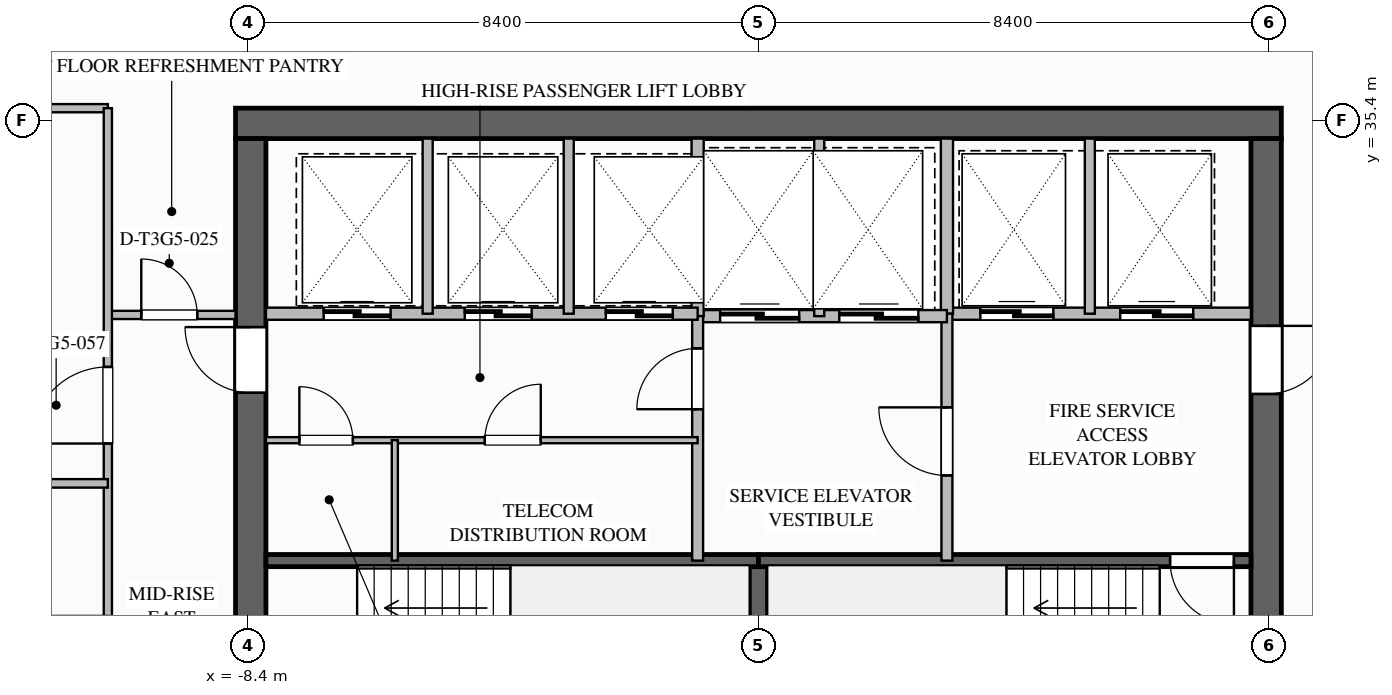
"""IFC4 building model, lengths in metres.
Left out: names, types, materials, properties, quantities, classifications, styles, units other than length and angle.
Written with IfcOpenShell. Run it as: python <this file> out.ifc"""

import sys

from ifc_helpers import new_model, si_unit, direction, frame, frame_2d, origin, place, context, subcontext, project, spatial, rectangle, extrude, element, fill, save


model = new_model("IFC4")
c1 = context("Model", 3, precision=1e-05, world=origin(), true_north=direction((0.0, 1.0)))
c2 = subcontext(c1, "Body", "Model", "MODEL_VIEW")
j1 = project(units=[si_unit("LENGTHUNIT", "METRE"), si_unit("PLANEANGLEUNIT", "RADIAN")], contexts=[c1])
p1 = place(None, origin())
s1 = spatial("IfcSite", under=j1, at=p1, CompositionType="ELEMENT")
p2 = place(p1, origin())
s2 = spatial("IfcBuilding", under=s1, at=p2, CompositionType="ELEMENT")
p3 = place(p2, frame((0.0, 0.0, 193.0)))
s3 = spatial("IfcBuildingStorey", under=s2, at=p3, CompositionType="ELEMENT", Elevation=193.0)
p4 = place(p3, frame((-8.6, 35.35, 0.0), z_axis=(0.0, 0.0, 1.0), x_axis=(1.0, 0.0, 0.0)))
e1 = element("IfcWall", 1, at=p4, inside=s3, PredefinedType="SHEAR", context=c2, shape_type="SweptSolid", body=[
    extrude(rectangle(XDim=17.2, YDim=0.5, at=frame_2d((8.6, 0.0))), origin(), (0.0, 0.0, 1.0), 3.55),
])
p5 = place(p3, frame((8.35, 35.1, 0.0), z_axis=(0.0, 0.0, 1.0), x_axis=(0.0, -1.0, 0.0)))
e2 = element("IfcWall", 2, at=p5, inside=s3, PredefinedType="SHEAR", context=c2, shape_type="SweptSolid", body=[
    extrude(rectangle(XDim=16.2, YDim=0.5, at=frame_2d((8.1, 0.0))), origin(), (0.0, 0.0, 1.0), 3.55),
])
p6 = place(p5, frame((3.08, 0.0, 0.0)))
e3 = element("IfcOpeningElement", 3, at=p6, cuts=e2, PredefinedType="OPENING", context=c2, shape_type="SweptSolid", body=[
    extrude(rectangle(XDim=1.12, YDim=2.1, at=frame_2d((0.56, 1.05))), frame((0.0, 0.26, 0.0), z_axis=(0.0, -1.0, 0.0), x_axis=(1.0, 0.0, 0.0)), (0.0, 0.0, 1.0), 0.52),
])
p7 = place(p5, frame((10.62, 0.0, 0.0)))
e4 = element("IfcOpeningElement", 4, at=p7, cuts=e2, PredefinedType="OPENING", context=c2, shape_type="SweptSolid", body=[
    extrude(rectangle(XDim=1.08, YDim=2.04, at=frame_2d((0.54, 1.02))), frame((0.0, 0.26, 0.0), z_axis=(0.0, -1.0, 0.0), x_axis=(1.0, 0.0, 0.0)), (0.0, 0.0, 1.0), 0.52),
])
p8 = place(p3, frame((-8.35, 18.9, 0.0), z_axis=(0.0, 0.0, 1.0), x_axis=(0.0, 1.0, 0.0)))
e5 = element("IfcWall", 5, at=p8, inside=s3, PredefinedType="SHEAR", context=c2, shape_type="SweptSolid", body=[
    extrude(rectangle(XDim=16.2, YDim=0.5, at=frame_2d((8.1, 0.0))), origin(), (0.0, 0.0, 1.0), 3.55),
])
p9 = place(p8, frame((12.02, 0.0, 0.0)))
e6 = element("IfcOpeningElement", 6, at=p9, cuts=e5, PredefinedType="OPENING", context=c2, shape_type="SweptSolid", body=[
    extrude(rectangle(XDim=1.08, YDim=2.04, at=frame_2d((0.54, 1.02))), frame((0.0, 0.26, 0.0), z_axis=(0.0, -1.0, 0.0), x_axis=(1.0, 0.0, 0.0)), (0.0, 0.0, 1.0), 0.52),
])
p10 = place(p8, frame((4.5, 0.0, 0.0)))
e7 = element("IfcOpeningElement", 7, at=p10, cuts=e5, PredefinedType="OPENING", context=c2, shape_type="SweptSolid", body=[
    extrude(rectangle(XDim=1.08, YDim=2.04, at=frame_2d((0.54, 1.02))), frame((0.0, 0.26, 0.0), z_axis=(0.0, -1.0, 0.0), x_axis=(1.0, 0.0, 0.0)), (0.0, 0.0, 1.0), 0.52),
])
p11 = place(p3, frame((0.0, 25.04, 0.0), z_axis=(0.0, 0.0, 1.0), x_axis=(0.0, 1.0, 0.0)))
e8 = element("IfcWall", 8, at=p11, inside=s3, PredefinedType="SOLIDWALL", context=c2, shape_type="SweptSolid", body=[
    extrude(rectangle(XDim=3.12, YDim=0.3, at=frame_2d((1.56, 0.0))), origin(), (0.0, 0.0, 1.0), 3.29),
])
p12 = place(p3, frame((-8.1, 28.16, 0.0), z_axis=(0.0, 0.0, 1.0), x_axis=(1.0, 0.0, 0.0)))
e9 = element("IfcWall", 9, at=p12, inside=s3, PredefinedType="SOLIDWALL", context=c2, shape_type="SweptSolid", body=[
    extrude(rectangle(XDim=8.1, YDim=0.2, at=frame_2d((4.05, 0.0))), origin(), (0.0, 0.0, 1.0), 3.29),
])
p13 = place(p3, frame((8.1, 28.16, 0.0), z_axis=(0.0, 0.0, 1.0), x_axis=(-1.0, 0.0, 0.0)))
e10 = element("IfcWall", 10, at=p13, inside=s3, PredefinedType="SOLIDWALL", context=c2, shape_type="SweptSolid", body=[
    extrude(rectangle(XDim=8.1, YDim=0.2, at=frame_2d((4.05, 0.0))), origin(), (0.0, 0.0, 1.0), 3.29),
])
p14 = place(p13, frame((0.28, 0.0, 0.0)))
e11 = element("IfcOpeningElement", 11, at=p14, cuts=e10, PredefinedType="OPENING", context=c2, shape_type="SweptSolid", body=[
    extrude(rectangle(XDim=1.05, YDim=2.1, at=frame_2d((0.525, 1.05))), frame((0.0, 0.11, 0.0), z_axis=(0.0, -1.0, 0.0), x_axis=(1.0, 0.0, 0.0)), (0.0, 0.0, 1.0), 0.22),
])
p15 = place(p3, frame((3.1, 32.22, 0.0), z_axis=(0.0, 0.0, 1.0), x_axis=(1.0, 0.0, 0.0)))
e12 = element("IfcWall", 12, at=p15, inside=s3, PredefinedType="SOLIDWALL", context=c2, shape_type="SweptSolid", body=[
    extrude(rectangle(XDim=5.0, YDim=0.2, at=frame_2d((2.5, 0.0))), origin(), (0.0, 0.0, 1.0), 3.29),
])
p16 = place(p15, frame((0.55, 0.0, 0.0)))
e13 = element("IfcOpeningElement", 13, at=p16, cuts=e12, PredefinedType="OPENING", context=c2, shape_type="SweptSolid", body=[
    extrude(rectangle(XDim=1.2, YDim=2.2, at=frame_2d((0.6, 1.1))), frame((0.0, 0.11, 0.0), z_axis=(0.0, -1.0, 0.0), x_axis=(1.0, 0.0, 0.0)), (0.0, 0.0, 1.0), 0.22),
])
p17 = place(p15, frame((2.85, 0.0, 0.0)))
e14 = element("IfcOpeningElement", 14, at=p17, cuts=e12, PredefinedType="OPENING", context=c2, shape_type="SweptSolid", body=[
    extrude(rectangle(XDim=1.2, YDim=2.2, at=frame_2d((0.6, 1.1))), frame((0.0, 0.11, 0.0), z_axis=(0.0, -1.0, 0.0), x_axis=(1.0, 0.0, 0.0)), (0.0, 0.0, 1.0), 0.22),
])
p18 = place(p3, frame((3.1, 32.22, 0.0), z_axis=(0.0, 0.0, 1.0), x_axis=(0.0, 1.0, 0.0)))
e15 = element("IfcWall", 15, at=p18, inside=s3, PredefinedType="SOLIDWALL", context=c2, shape_type="SweptSolid", body=[
    extrude(rectangle(XDim=2.88, YDim=0.2, at=frame_2d((1.44, 0.0))), origin(), (0.0, 0.0, 1.0), 3.29),
])
p19 = place(p3, frame((5.45, 32.22, 0.0), z_axis=(0.0, 0.0, 1.0), x_axis=(0.0, 1.0, 0.0)))
e16 = element("IfcWall", 16, at=p19, inside=s3, PredefinedType="PARTITIONING", context=c2, shape_type="SweptSolid", body=[
    extrude(rectangle(XDim=2.88, YDim=0.165, at=frame_2d((1.44, 0.0))), origin(), (0.0, 0.0, 1.0), 3.29),
])
p20 = place(p3, frame((3.1, 28.16, 0.0), z_axis=(0.0, 0.0, 1.0), x_axis=(0.0, 1.0, 0.0)))
e17 = element("IfcWall", 17, at=p20, inside=s3, PredefinedType="SOLIDWALL", context=c2, shape_type="SweptSolid", body=[
    extrude(rectangle(XDim=4.06, YDim=0.18, at=frame_2d((2.03, 0.0))), origin(), (0.0, 0.0, 1.0), 3.29),
])
p21 = place(p20, frame((1.4, 0.0, 0.0)))
e18 = element("IfcOpeningElement", 18, at=p21, cuts=e17, PredefinedType="OPENING", context=c2, shape_type="SweptSolid", body=[
    extrude(rectangle(XDim=1.12, YDim=2.1, at=frame_2d((0.56, 1.05))), frame((0.0, 0.1, 0.0), z_axis=(0.0, -1.0, 0.0), x_axis=(1.0, 0.0, 0.0)), (0.0, 0.0, 1.0), 0.2),
])
p22 = place(p3, frame((-1.0, 32.18, 0.0), z_axis=(0.0, 0.0, 1.0), x_axis=(1.0, 0.0, 0.0)))
e19 = element("IfcWall", 19, at=p22, inside=s3, PredefinedType="SOLIDWALL", context=c2, shape_type="SweptSolid", body=[
    extrude(rectangle(XDim=4.1, YDim=0.2, at=frame_2d((2.05, 0.0))), origin(), (0.0, 0.0, 1.0), 3.29),
])
p23 = place(p22, frame((0.37, 0.0, 0.0)))
e20 = element("IfcOpeningElement", 20, at=p23, cuts=e19, PredefinedType="OPENING", context=c2, shape_type="SweptSolid", body=[
    extrude(rectangle(XDim=1.3, YDim=2.2, at=frame_2d((0.65, 1.1))), frame((0.0, 0.11, 0.0), z_axis=(0.0, -1.0, 0.0), x_axis=(1.0, 0.0, 0.0)), (0.0, 0.0, 1.0), 0.22),
])
p24 = place(p22, frame((2.33, 0.0, 0.0)))
e21 = element("IfcOpeningElement", 21, at=p24, cuts=e19, PredefinedType="OPENING", context=c2, shape_type="SweptSolid", body=[
    extrude(rectangle(XDim=1.3, YDim=2.2, at=frame_2d((0.65, 1.1))), frame((0.0, 0.11, 0.0), z_axis=(0.0, -1.0, 0.0), x_axis=(1.0, 0.0, 0.0)), (0.0, 0.0, 1.0), 0.22),
])
p25 = place(p3, frame((-1.0, 32.18, 0.0), z_axis=(0.0, 0.0, 1.0), x_axis=(0.0, 1.0, 0.0)))
e22 = element("IfcWall", 22, at=p25, inside=s3, PredefinedType="SOLIDWALL", context=c2, shape_type="SweptSolid", body=[
    extrude(rectangle(XDim=2.92, YDim=0.2, at=frame_2d((1.46, 0.0))), origin(), (0.0, 0.0, 1.0), 3.29),
])
p26 = place(p3, frame((1.0, 32.18, 0.0), z_axis=(0.0, 0.0, 1.0), x_axis=(0.0, 1.0, 0.0)))
e23 = element("IfcWall", 23, at=p26, inside=s3, PredefinedType="PARTITIONING", context=c2, shape_type="SweptSolid", body=[
    extrude(rectangle(XDim=2.92, YDim=0.165, at=frame_2d((1.46, 0.0))), origin(), (0.0, 0.0, 1.0), 3.29),
])
p27 = place(p3, frame((-1.0, 28.16, 0.0), z_axis=(0.0, 0.0, 1.0), x_axis=(0.0, 1.0, 0.0)))
e24 = element("IfcWall", 24, at=p27, inside=s3, PredefinedType="SOLIDWALL", context=c2, shape_type="SweptSolid", body=[
    extrude(rectangle(XDim=4.02, YDim=0.18, at=frame_2d((2.01, 0.0))), origin(), (0.0, 0.0, 1.0), 3.29),
])
p28 = place(p27, frame((2.49, 0.0, 0.0)))
e25 = element("IfcOpeningElement", 25, at=p28, cuts=e24, PredefinedType="OPENING", context=c2, shape_type="SweptSolid", body=[
    extrude(rectangle(XDim=1.0, YDim=2.1, at=frame_2d((0.5, 1.05))), frame((0.0, 0.1, 0.0), z_axis=(0.0, -1.0, 0.0), x_axis=(1.0, 0.0, 0.0)), (0.0, 0.0, 1.0), 0.2),
])
p29 = place(p3, frame((-8.1, 32.22, 0.0), z_axis=(0.0, 0.0, 1.0), x_axis=(1.0, 0.0, 0.0)))
e26 = element("IfcWall", 26, at=p29, inside=s3, PredefinedType="SOLIDWALL", context=c2, shape_type="SweptSolid", body=[
    extrude(rectangle(XDim=7.1, YDim=0.2, at=frame_2d((3.55, 0.0))), origin(), (0.0, 0.0, 1.0), 3.29),
])
p30 = place(p29, frame((0.95, 0.0, 0.0)))
e27 = element("IfcOpeningElement", 27, at=p30, cuts=e26, PredefinedType="OPENING", context=c2, shape_type="SweptSolid", body=[
    extrude(rectangle(XDim=1.1, YDim=2.2, at=frame_2d((0.55, 1.1))), frame((0.0, 0.11, 0.0), z_axis=(0.0, -1.0, 0.0), x_axis=(1.0, 0.0, 0.0)), (0.0, 0.0, 1.0), 0.22),
])
p31 = place(p29, frame((3.27, 0.0, 0.0)))
e28 = element("IfcOpeningElement", 28, at=p31, cuts=e26, PredefinedType="OPENING", context=c2, shape_type="SweptSolid", body=[
    extrude(rectangle(XDim=1.1, YDim=2.2, at=frame_2d((0.55, 1.1))), frame((0.0, 0.11, 0.0), z_axis=(0.0, -1.0, 0.0), x_axis=(1.0, 0.0, 0.0)), (0.0, 0.0, 1.0), 0.22),
])
p32 = place(p29, frame((5.59, 0.0, 0.0)))
e29 = element("IfcOpeningElement", 29, at=p32, cuts=e26, PredefinedType="OPENING", context=c2, shape_type="SweptSolid", body=[
    extrude(rectangle(XDim=1.1, YDim=2.2, at=frame_2d((0.55, 1.1))), frame((0.0, 0.11, 0.0), z_axis=(0.0, -1.0, 0.0), x_axis=(1.0, 0.0, 0.0)), (0.0, 0.0, 1.0), 0.22),
])
for number, where, z_axis, x_axis in (
    (30, (-5.44, 32.22, 0.0), (0.0, 0.0, 1.0), (0.0, 1.0, 0.0)),
    (31, (-3.12, 32.22, 0.0), (0.0, 0.0, 1.0), (0.0, 1.0, 0.0)),
):
    element("IfcWall", number, at=place(p3, frame(where, z_axis=z_axis, x_axis=x_axis)), inside=s3, PredefinedType="PARTITIONING", context=c2, shape_type="SweptSolid", body=[
        extrude(rectangle(XDim=2.88, YDim=0.165, at=frame_2d((1.44, 0.0))), origin(), (0.0, 0.0, 1.0), 3.29),
    ])
p33 = place(p3, frame((-8.1, 30.14, 0.0), z_axis=(0.0, 0.0, 1.0), x_axis=(1.0, 0.0, 0.0)))
e32 = element("IfcWall", 32, at=p33, inside=s3, PredefinedType="PARTITIONING", context=c2, shape_type="SweptSolid", body=[
    extrude(rectangle(XDim=7.1, YDim=0.1, at=frame_2d((3.55, 0.0))), origin(), (0.0, 0.0, 1.0), 3.29),
])
p34 = place(p33, frame((0.55, 0.0, 0.0)))
e33 = element("IfcOpeningElement", 33, at=p34, cuts=e32, PredefinedType="OPENING", context=c2, shape_type="SweptSolid", body=[
    extrude(rectangle(XDim=0.88, YDim=2.1, at=frame_2d((0.44, 1.05))), frame((0.0, 0.06, 0.0), z_axis=(0.0, -1.0, 0.0), x_axis=(1.0, 0.0, 0.0)), (0.0, 0.0, 1.0), 0.12),
])
p35 = place(p33, frame((3.6, 0.0, 0.0)))
e34 = element("IfcOpeningElement", 34, at=p35, cuts=e32, PredefinedType="OPENING", context=c2, shape_type="SweptSolid", body=[
    extrude(rectangle(XDim=0.92, YDim=2.1, at=frame_2d((0.46, 1.05))), frame((0.0, 0.06, 0.0), z_axis=(0.0, -1.0, 0.0), x_axis=(1.0, 0.0, 0.0)), (0.0, 0.0, 1.0), 0.12),
])
p36 = place(p3, frame((-5.98, 28.16, 0.0), z_axis=(0.0, 0.0, 1.0), x_axis=(0.0, 1.0, 0.0)))
e35 = element("IfcWall", 35, at=p36, inside=s3, PredefinedType="PARTITIONING", context=c2, shape_type="SweptSolid", body=[
    extrude(rectangle(XDim=1.98, YDim=0.1, at=frame_2d((0.99, 0.0))), origin(), (0.0, 0.0, 1.0), 3.29),
])
p37 = place(p3, frame((-10.7, 32.2, 0.0), z_axis=(0.0, 0.0, 1.0), x_axis=(1.0, 0.0, 0.0)))
e36 = element("IfcWall", 36, at=p37, inside=s3, PredefinedType="PARTITIONING", context=c2, shape_type="SweptSolid", body=[
    extrude(rectangle(XDim=2.1, YDim=0.135, at=frame_2d((1.05, 0.0))), origin(), (0.0, 0.0, 1.0), 3.29),
])
p38 = place(p37, frame((0.55, 0.0, 0.0)))
e37 = element("IfcOpeningElement", 37, at=p38, cuts=e36, PredefinedType="OPENING", context=c2, shape_type="SweptSolid", body=[
    extrude(rectangle(XDim=0.92, YDim=2.1, at=frame_2d((0.46, 1.05))), frame((0.0, 0.077, 0.0), z_axis=(0.0, -1.0, 0.0), x_axis=(1.0, 0.0, 0.0)), (0.0, 0.0, 1.0), 0.155),
])
p39 = place(p3, frame((-16.2, 35.6, 0.0), z_axis=(0.0, 0.0, 1.0), x_axis=(1.0, 0.0, 0.0)))
e38 = element("IfcWall", 38, at=p39, inside=s3, PredefinedType="PARTITIONING", context=c2, shape_type="SweptSolid", body=[
    extrude(rectangle(XDim=5.5, YDim=0.135, at=frame_2d((2.75, 0.0))), origin(), (0.0, 0.0, 1.0), 2.667),
])
p40 = place(p3, frame((-10.7, 18.4, 0.0), z_axis=(0.0, 0.0, 1.0), x_axis=(0.0, 1.0, 0.0)))
e39 = element("IfcWall", 39, at=p40, inside=s3, PredefinedType="PARTITIONING", context=c2, shape_type="SweptSolid", body=[
    extrude(rectangle(XDim=17.2, YDim=0.135, at=frame_2d((8.6, 0.0))), origin(), (0.0, 0.0, 1.0), 3.29),
])
p41 = place(p40, frame((4.255, 0.0, 0.0)))
e40 = element("IfcOpeningElement", 40, at=p41, cuts=e39, PredefinedType="OPENING", context=c2, shape_type="SweptSolid", body=[
    extrude(rectangle(XDim=1.26, YDim=2.2, at=frame_2d((0.63, 1.1))), frame((0.0, 0.077, 0.0), z_axis=(0.0, -1.0, 0.0), x_axis=(1.0, 0.0, 0.0)), (0.0, 0.0, 1.0), 0.155),
])
p42 = place(p40, frame((11.685, 0.0, 0.0)))
e41 = element("IfcOpeningElement", 41, at=p42, cuts=e39, PredefinedType="OPENING", context=c2, shape_type="SweptSolid", body=[
    extrude(rectangle(XDim=1.26, YDim=2.2, at=frame_2d((0.63, 1.1))), frame((0.0, 0.077, 0.0), z_axis=(0.0, -1.0, 0.0), x_axis=(1.0, 0.0, 0.0)), (0.0, 0.0, 1.0), 0.155),
])
p43 = place(p3, frame((-10.7, 29.43, 0.0), z_axis=(0.0, 0.0, 1.0), x_axis=(-1.0, 0.0, 0.0)))
e42 = element("IfcWall", 42, at=p43, inside=s3, PredefinedType="PLUMBINGWALL", context=c2, shape_type="SweptSolid", body=[
    extrude(rectangle(XDim=2.15, YDim=0.14, at=frame_2d((1.075, 0.0))), origin(), (0.0, 0.0, 1.0), 3.29),
])
p44 = place(p14, origin())
e43 = element("IfcDoor", 43, at=p44, inside=s3, OperationType="SINGLE_SWING_LEFT", PredefinedType="DOOR", context=c2, shape_type="SweptSolid", body=[
    extrude(rectangle(XDim=1.05, YDim=2.1, at=frame_2d((0.525, 1.05))), frame((0.0, 0.025, 0.0), z_axis=(0.0, -1.0, 0.0), x_axis=(1.0, 0.0, 0.0)), (0.0, 0.0, 1.0), 0.05),
])
fill(e11, e43)
p45 = place(p16, origin())
e44 = element("IfcDoor", 44, at=p45, inside=s3, OperationType="SLIDING_TO_LEFT", PredefinedType="DOOR", context=c2, shape_type="SweptSolid", body=[
    extrude(rectangle(XDim=1.2, YDim=2.2, at=frame_2d((0.6, 1.1))), frame((0.0, 0.025, 0.0), z_axis=(0.0, -1.0, 0.0), x_axis=(1.0, 0.0, 0.0)), (0.0, 0.0, 1.0), 0.05),
])
fill(e13, e44)
p46 = place(p17, origin())
e45 = element("IfcDoor", 45, at=p46, inside=s3, OperationType="SLIDING_TO_LEFT", PredefinedType="DOOR", context=c2, shape_type="SweptSolid", body=[
    extrude(rectangle(XDim=1.2, YDim=2.2, at=frame_2d((0.6, 1.1))), frame((0.0, 0.025, 0.0), z_axis=(0.0, -1.0, 0.0), x_axis=(1.0, 0.0, 0.0)), (0.0, 0.0, 1.0), 0.05),
])
fill(e14, e45)
p47 = place(p21, origin())
e46 = element("IfcDoor", 46, at=p47, inside=s3, OperationType="SINGLE_SWING_RIGHT", PredefinedType="DOOR", context=c2, shape_type="SweptSolid", body=[
    extrude(rectangle(XDim=1.12, YDim=2.1, at=frame_2d((0.56, 1.05))), frame((0.0, 0.025, 0.0), z_axis=(0.0, -1.0, 0.0), x_axis=(1.0, 0.0, 0.0)), (0.0, 0.0, 1.0), 0.05),
])
fill(e18, e46)
p48 = place(p6, origin())
e47 = element("IfcDoor", 47, at=p48, inside=s3, OperationType="SINGLE_SWING_LEFT", PredefinedType="DOOR", context=c2, shape_type="SweptSolid", body=[
    extrude(rectangle(XDim=1.12, YDim=2.1, at=frame_2d((0.56, 1.05))), frame((0.0, 0.025, 0.0), z_axis=(0.0, -1.0, 0.0), x_axis=(1.0, 0.0, 0.0)), (0.0, 0.0, 1.0), 0.05),
])
fill(e3, e47)
p49 = place(p23, origin())
e48 = element("IfcDoor", 48, at=p49, inside=s3, OperationType="SLIDING_TO_LEFT", PredefinedType="DOOR", context=c2, shape_type="SweptSolid", body=[
    extrude(rectangle(XDim=1.3, YDim=2.2, at=frame_2d((0.65, 1.1))), frame((0.0, 0.025, 0.0), z_axis=(0.0, -1.0, 0.0), x_axis=(1.0, 0.0, 0.0)), (0.0, 0.0, 1.0), 0.05),
])
fill(e20, e48)
p50 = place(p24, origin())
e49 = element("IfcDoor", 49, at=p50, inside=s3, OperationType="SLIDING_TO_LEFT", PredefinedType="DOOR", context=c2, shape_type="SweptSolid", body=[
    extrude(rectangle(XDim=1.3, YDim=2.2, at=frame_2d((0.65, 1.1))), frame((0.0, 0.025, 0.0), z_axis=(0.0, -1.0, 0.0), x_axis=(1.0, 0.0, 0.0)), (0.0, 0.0, 1.0), 0.05),
])
fill(e21, e49)
p51 = place(p28, origin())
e50 = element("IfcDoor", 50, at=p51, inside=s3, OperationType="SINGLE_SWING_LEFT", PredefinedType="DOOR", context=c2, shape_type="SweptSolid", body=[
    extrude(rectangle(XDim=1.0, YDim=2.1, at=frame_2d((0.5, 1.05))), frame((0.0, 0.025, 0.0), z_axis=(0.0, -1.0, 0.0), x_axis=(1.0, 0.0, 0.0)), (0.0, 0.0, 1.0), 0.05),
])
fill(e25, e50)
p52 = place(p30, origin())
e51 = element("IfcDoor", 51, at=p52, inside=s3, OperationType="SLIDING_TO_LEFT", PredefinedType="DOOR", context=c2, shape_type="SweptSolid", body=[
    extrude(rectangle(XDim=1.1, YDim=2.2, at=frame_2d((0.55, 1.1))), frame((0.0, 0.025, 0.0), z_axis=(0.0, -1.0, 0.0), x_axis=(1.0, 0.0, 0.0)), (0.0, 0.0, 1.0), 0.05),
])
fill(e27, e51)
p53 = place(p31, origin())
e52 = element("IfcDoor", 52, at=p53, inside=s3, OperationType="SLIDING_TO_LEFT", PredefinedType="DOOR", context=c2, shape_type="SweptSolid", body=[
    extrude(rectangle(XDim=1.1, YDim=2.2, at=frame_2d((0.55, 1.1))), frame((0.0, 0.025, 0.0), z_axis=(0.0, -1.0, 0.0), x_axis=(1.0, 0.0, 0.0)), (0.0, 0.0, 1.0), 0.05),
])
fill(e28, e52)
p54 = place(p32, origin())
e53 = element("IfcDoor", 53, at=p54, inside=s3, OperationType="SLIDING_TO_LEFT", PredefinedType="DOOR", context=c2, shape_type="SweptSolid", body=[
    extrude(rectangle(XDim=1.1, YDim=2.2, at=frame_2d((0.55, 1.1))), frame((0.0, 0.025, 0.0), z_axis=(0.0, -1.0, 0.0), x_axis=(1.0, 0.0, 0.0)), (0.0, 0.0, 1.0), 0.05),
])
fill(e29, e53)
p55 = place(p9, origin())
e54 = element("IfcDoor", 54, at=p55, inside=s3, OperationType="SINGLE_SWING_RIGHT", PredefinedType="DOOR", context=c2, shape_type="SweptSolid", body=[
    extrude(rectangle(XDim=1.08, YDim=2.04, at=frame_2d((0.54, 1.02))), frame((0.0, 0.025, 0.0), z_axis=(0.0, -1.0, 0.0), x_axis=(1.0, 0.0, 0.0)), (0.0, 0.0, 1.0), 0.05),
])
fill(e6, e54)
p56 = place(p34, origin())
e55 = element("IfcDoor", 55, at=p56, inside=s3, OperationType="SINGLE_SWING_LEFT", PredefinedType="DOOR", context=c2, shape_type="SweptSolid", body=[
    extrude(rectangle(XDim=0.88, YDim=2.1, at=frame_2d((0.44, 1.05))), frame((0.0, 0.025, 0.0), z_axis=(0.0, -1.0, 0.0), x_axis=(1.0, 0.0, 0.0)), (0.0, 0.0, 1.0), 0.05),
])
fill(e33, e55)
p57 = place(p35, origin())
e56 = element("IfcDoor", 56, at=p57, inside=s3, OperationType="SINGLE_SWING_RIGHT", PredefinedType="DOOR", context=c2, shape_type="SweptSolid", body=[
    extrude(rectangle(XDim=0.92, YDim=2.1, at=frame_2d((0.46, 1.05))), frame((0.0, 0.025, 0.0), z_axis=(0.0, -1.0, 0.0), x_axis=(1.0, 0.0, 0.0)), (0.0, 0.0, 1.0), 0.05),
])
fill(e34, e56)
p58 = place(p38, origin())
e57 = element("IfcDoor", 57, at=p58, inside=s3, OperationType="SINGLE_SWING_LEFT", PredefinedType="DOOR", context=c2, shape_type="SweptSolid", body=[
    extrude(rectangle(XDim=0.92, YDim=2.1, at=frame_2d((0.46, 1.05))), frame((0.0, 0.025, 0.0), z_axis=(0.0, -1.0, 0.0), x_axis=(1.0, 0.0, 0.0)), (0.0, 0.0, 1.0), 0.05),
])
fill(e37, e57)
p59 = place(p42, origin())
e58 = element("IfcDoor", 58, at=p59, inside=s3, OperationType="SINGLE_SWING_LEFT", PredefinedType="DOOR", context=c2, shape_type="SweptSolid", body=[
    extrude(rectangle(XDim=1.26, YDim=2.2, at=frame_2d((0.63, 1.1))), frame((0.0, 0.025, 0.0), z_axis=(0.0, -1.0, 0.0), x_axis=(1.0, 0.0, 0.0)), (0.0, 0.0, 1.0), 0.05),
])
fill(e41, e58)
save(model, sys.argv[1])
